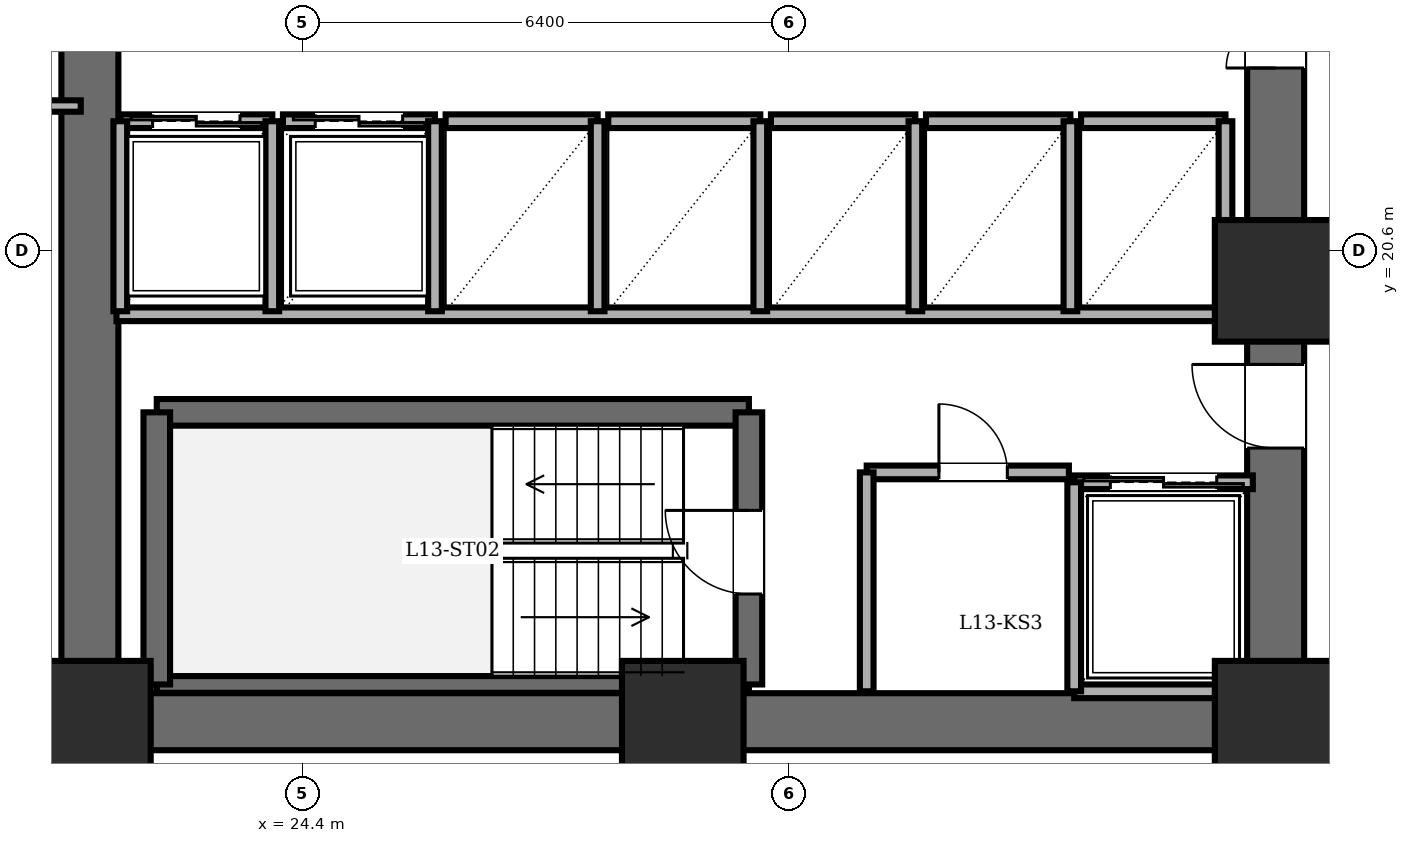
"""IFC4 building model, lengths in metres.
Left out: names, types, materials, properties, quantities, classifications, styles, units other than length and angle.
Written with IfcOpenShell. Run it as: python <this file> out.ifc"""

import sys

from ifc_helpers import new_model, si_unit, direction, frame, frame_2d, origin, origin_2d, place, context, subcontext, project, spatial, rectangle, extrude, element, fill, save


model = new_model("IFC4")
c1 = context("Model", 3, precision=1e-05, world=origin(), true_north=direction((0.0, 1.0)))
c2 = subcontext(c1, "Body", "Model", "MODEL_VIEW")
j1 = project(units=[si_unit("LENGTHUNIT", "METRE"), si_unit("PLANEANGLEUNIT", "RADIAN")], contexts=[c1])
p1 = place(None, origin())
s1 = spatial("IfcSite", under=j1, at=p1, CompositionType="ELEMENT")
p2 = place(p1, origin())
s2 = spatial("IfcBuilding", under=s1, at=p2, CompositionType="ELEMENT")
p3 = place(p2, frame((0.0, 0.0, 50.4)))
s3 = spatial("IfcBuildingStorey", under=s2, at=p3, CompositionType="ELEMENT", Elevation=50.4)
for number, where, z_axis, x_axis in (
    (1, (21.6, 14.4, 0.0), (0.0, 0.0, 1.0), (1.0, 0.0, 0.0)),
    (2, (29.4, 14.4, 0.0), (0.0, 0.0, 1.0), (1.0, 0.0, 0.0)),
    (3, (37.2, 14.4, 0.0), (0.0, 0.0, 1.0), (1.0, 0.0, 0.0)),
    (4, (37.2, 20.2, 0.0), (0.0, 0.0, 1.0), (1.0, 0.0, 0.0)),
):
    element("IfcColumn", number, at=place(p3, frame(where, z_axis=z_axis, x_axis=x_axis)), inside=s3, PredefinedType="COLUMN", context=c2, shape_type="SweptSolid", body=[
        extrude(rectangle(XDim=1.6, YDim=1.6, at=origin_2d()), origin(), (0.0, 0.0, 1.0), 3.6),
    ])
p4 = place(p3, frame((21.6, 14.4, 0.0), z_axis=(0.0, 0.0, 1.0), x_axis=(0.0, 1.0, 0.0)))
e5 = element("IfcWall", 5, at=p4, inside=s3, PredefinedType="SHEAR", context=c2, shape_type="SweptSolid", body=[
    extrude(rectangle(XDim=19.2, YDim=0.75, at=frame_2d((9.6, 0.0))), origin(), (0.0, 0.0, 1.0), 3.4),
])
p5 = place(p3, frame((37.2, 14.4, 0.0), z_axis=(0.0, 0.0, 1.0), x_axis=(-1.0, 0.0, 0.0)))
e6 = element("IfcWall", 6, at=p5, inside=s3, PredefinedType="SHEAR", context=c2, shape_type="SweptSolid", body=[
    extrude(rectangle(XDim=15.6, YDim=0.75, at=frame_2d((7.8, 0.0))), origin(), (0.0, 0.0, 1.0), 3.4),
])
p6 = place(p3, frame((37.2, 14.4, 0.0), z_axis=(0.0, 0.0, 1.0), x_axis=(0.0, 1.0, 0.0)))
e7 = element("IfcWall", 7, at=p6, inside=s3, PredefinedType="SHEAR", context=c2, shape_type="SweptSolid", body=[
    extrude(rectangle(XDim=19.2, YDim=0.75, at=frame_2d((9.6, 0.0))), origin(), (0.0, 0.0, 1.0), 3.4),
])
p7 = place(p6, frame((15.8, 0.0, 0.0)))
e8 = element("IfcOpeningElement", 8, at=p7, cuts=e7, PredefinedType="OPENING", context=c2, shape_type="SweptSolid", body=[
    extrude(rectangle(XDim=1.15, YDim=2.15, at=frame_2d((0.575, 1.075))), frame((0.0, 0.385, 0.0), z_axis=(0.0, -1.0, 0.0), x_axis=(1.0, 0.0, 0.0)), (0.0, 0.0, 1.0), 0.77),
])
p8 = place(p6, frame((3.6, 0.0, 0.0)))
e9 = element("IfcOpeningElement", 9, at=p8, cuts=e7, PredefinedType="OPENING", context=c2, shape_type="SweptSolid", body=[
    extrude(rectangle(XDim=1.1, YDim=2.15, at=frame_2d((0.55, 1.075))), frame((0.0, 0.385, 0.0), z_axis=(0.0, -1.0, 0.0), x_axis=(1.0, 0.0, 0.0)), (0.0, 0.0, 1.0), 0.77),
])
p9 = place(p6, frame((8.6, 0.0, 0.0)))
e10 = element("IfcOpeningElement", 10, at=p9, cuts=e7, PredefinedType="OPENING", context=c2, shape_type="SweptSolid", body=[
    extrude(rectangle(XDim=1.3, YDim=2.2, at=frame_2d((0.65, 1.1))), frame((0.0, 0.385, 0.0), z_axis=(0.0, -1.0, 0.0), x_axis=(1.0, 0.0, 0.0)), (0.0, 0.0, 1.0), 0.77),
])
p10 = place(p3, frame((22.48, 18.47, 0.0), z_axis=(0.0, 0.0, 1.0), x_axis=(1.0, 0.0, 0.0)))
e11 = element("IfcWall", 11, at=p10, inside=s3, PredefinedType="SOLIDWALL", context=c2, shape_type="SweptSolid", body=[
    extrude(rectangle(XDim=7.79, YDim=0.35, at=frame_2d((3.895, 0.0))), origin(), (0.0, 0.0, 1.0), 3.4),
])
p11 = place(p3, frame((22.48, 14.89, 0.0), z_axis=(0.0, 0.0, 1.0), x_axis=(1.0, 0.0, 0.0)))
e12 = element("IfcWall", 12, at=p11, inside=s3, PredefinedType="PARTITIONING", context=c2, shape_type="SweptSolid", body=[
    extrude(rectangle(XDim=7.79, YDim=0.22, at=frame_2d((3.895, 0.0))), origin(), (0.0, 0.0, 1.0), 3.4),
])
p12 = place(p3, frame((22.48, 14.89, 0.0), z_axis=(0.0, 0.0, 1.0), x_axis=(0.0, 1.0, 0.0)))
e13 = element("IfcWall", 13, at=p12, inside=s3, PredefinedType="SOLIDWALL", context=c2, shape_type="SweptSolid", body=[
    extrude(rectangle(XDim=3.58, YDim=0.35, at=frame_2d((1.79, 0.0))), origin(), (0.0, 0.0, 1.0), 3.4),
])
p13 = place(p3, frame((30.27, 14.89, 0.0), z_axis=(0.0, 0.0, 1.0), x_axis=(0.0, 1.0, 0.0)))
e14 = element("IfcWall", 14, at=p13, inside=s3, PredefinedType="SOLIDWALL", context=c2, shape_type="SweptSolid", body=[
    extrude(rectangle(XDim=3.58, YDim=0.35, at=frame_2d((1.79, 0.0))), origin(), (0.0, 0.0, 1.0), 3.4),
])
p14 = place(p13, frame((1.19, 0.0, 0.0)))
e15 = element("IfcOpeningElement", 15, at=p14, cuts=e14, PredefinedType="OPENING", context=c2, shape_type="SweptSolid", body=[
    extrude(rectangle(XDim=1.1, YDim=2.15, at=frame_2d((0.55, 1.075))), frame((0.0, 0.185, 0.0), z_axis=(0.0, -1.0, 0.0), x_axis=(1.0, 0.0, 0.0)), (0.0, 0.0, 1.0), 0.37),
])
p15 = place(p3, frame((21.95, 19.76, 0.0), z_axis=(0.0, 0.0, 1.0), x_axis=(1.0, 0.0, 0.0)))
e16 = element("IfcWall", 16, at=p15, inside=s3, PredefinedType="PARTITIONING", context=c2, shape_type="SweptSolid", body=[
    extrude(rectangle(XDim=14.87, YDim=0.18, at=frame_2d((7.435, 0.0))), origin(), (0.0, 0.0, 1.0), 3.4),
])
p16 = place(p3, frame((31.82, 17.68, 0.0), z_axis=(0.0, 0.0, 1.0), x_axis=(1.0, 0.0, 0.0)))
e17 = element("IfcWall", 17, at=p16, inside=s3, PredefinedType="PARTITIONING", context=c2, shape_type="SweptSolid", body=[
    extrude(rectangle(XDim=2.66, YDim=0.18, at=frame_2d((1.33, 0.0))), origin(), (0.0, 0.0, 1.0), 3.4),
])
p17 = place(p16, frame((0.95, 0.0, 0.0)))
e18 = element("IfcOpeningElement", 18, at=p17, cuts=e17, PredefinedType="OPENING", context=c2, shape_type="SweptSolid", body=[
    extrude(rectangle(XDim=0.9, YDim=2.05, at=frame_2d((0.45, 1.025))), frame((0.0, 0.1, 0.0), z_axis=(0.0, -1.0, 0.0), x_axis=(1.0, 0.0, 0.0)), (0.0, 0.0, 1.0), 0.2),
])
p18 = place(p3, frame((31.82, 14.8, 0.0), z_axis=(0.0, 0.0, 1.0), x_axis=(0.0, 1.0, 0.0)))
e19 = element("IfcWall", 19, at=p18, inside=s3, PredefinedType="PARTITIONING", context=c2, shape_type="SweptSolid", body=[
    extrude(rectangle(XDim=2.88, YDim=0.18, at=frame_2d((1.44, 0.0))), origin(), (0.0, 0.0, 1.0), 3.4),
])
p19 = place(p3, frame((34.55, 17.55, 0.0), z_axis=(0.0, 0.0, 1.0), x_axis=(1.0, 0.0, 0.0)))
e20 = element("IfcWall", 20, at=p19, inside=s3, PredefinedType="PARTITIONING", context=c2, shape_type="SweptSolid", body=[
    extrude(rectangle(XDim=2.35, YDim=0.18, at=frame_2d((1.175, 0.0))), origin(), (0.0, 0.0, 1.0), 3.4),
])
p20 = place(p19, frame((0.475, 0.0, 0.0)))
e21 = element("IfcOpeningElement", 21, at=p20, cuts=e20, PredefinedType="OPENING", context=c2, shape_type="SweptSolid", body=[
    extrude(rectangle(XDim=1.4, YDim=2.3, at=frame_2d((0.7, 1.15))), frame((0.0, 0.1, 0.0), z_axis=(0.0, -1.0, 0.0), x_axis=(1.0, 0.0, 0.0)), (0.0, 0.0, 1.0), 0.2),
])
p21 = place(p3, frame((36.9, 14.8, 0.0), z_axis=(0.0, 0.0, 1.0), x_axis=(-1.0, 0.0, 0.0)))
e22 = element("IfcWall", 22, at=p21, inside=s3, PredefinedType="PARTITIONING", context=c2, shape_type="SweptSolid", body=[
    extrude(rectangle(XDim=2.35, YDim=0.18, at=frame_2d((1.175, 0.0))), origin(), (0.0, 0.0, 1.0), 3.4),
])
p22 = place(p3, frame((34.55, 17.55, 0.0), z_axis=(0.0, 0.0, 1.0), x_axis=(0.0, -1.0, 0.0)))
e23 = element("IfcWall", 23, at=p22, inside=s3, PredefinedType="PARTITIONING", context=c2, shape_type="SweptSolid", body=[
    extrude(rectangle(XDim=2.75, YDim=0.18, at=frame_2d((1.375, 0.0))), origin(), (0.0, 0.0, 1.0), 3.4),
])
p23 = place(p3, frame((22.0, 22.3, 0.0), z_axis=(0.0, 0.0, 1.0), x_axis=(1.0, 0.0, 0.0)))
e24 = element("IfcWall", 24, at=p23, inside=s3, PredefinedType="PARTITIONING", context=c2, shape_type="SweptSolid", body=[
    extrude(rectangle(XDim=2.0, YDim=0.18, at=frame_2d((1.0, 0.0))), origin(), (0.0, 0.0, 1.0), 3.4),
])
p24 = place(p23, frame((0.425, 0.0, 0.0)))
e25 = element("IfcOpeningElement", 25, at=p24, cuts=e24, PredefinedType="OPENING", context=c2, shape_type="SweptSolid", body=[
    extrude(rectangle(XDim=1.15, YDim=2.2, at=frame_2d((0.575, 1.1))), frame((0.0, 0.1, 0.0), z_axis=(0.0, -1.0, 0.0), x_axis=(1.0, 0.0, 0.0)), (0.0, 0.0, 1.0), 0.2),
])
for number, where, z_axis, x_axis in (
    (26, (24.0, 19.8, 0.0), (0.0, 0.0, 1.0), (0.0, 1.0, 0.0)),
    (27, (22.0, 22.3, 0.0), (0.0, 0.0, 1.0), (0.0, -1.0, 0.0)),
):
    element("IfcWall", number, at=place(p3, frame(where, z_axis=z_axis, x_axis=x_axis)), inside=s3, PredefinedType="PARTITIONING", context=c2, shape_type="SweptSolid", body=[
        extrude(rectangle(XDim=2.5, YDim=0.18, at=frame_2d((1.25, 0.0))), origin(), (0.0, 0.0, 1.0), 3.4),
    ])
p25 = place(p3, frame((24.14, 22.3, 0.0), z_axis=(0.0, 0.0, 1.0), x_axis=(1.0, 0.0, 0.0)))
e28 = element("IfcWall", 28, at=p25, inside=s3, PredefinedType="PARTITIONING", context=c2, shape_type="SweptSolid", body=[
    extrude(rectangle(XDim=2.0, YDim=0.18, at=frame_2d((1.0, 0.0))), origin(), (0.0, 0.0, 1.0), 3.4),
])
p26 = place(p25, frame((0.425, 0.0, 0.0)))
e29 = element("IfcOpeningElement", 29, at=p26, cuts=e28, PredefinedType="OPENING", context=c2, shape_type="SweptSolid", body=[
    extrude(rectangle(XDim=1.15, YDim=2.2, at=frame_2d((0.575, 1.1))), frame((0.0, 0.1, 0.0), z_axis=(0.0, -1.0, 0.0), x_axis=(1.0, 0.0, 0.0)), (0.0, 0.0, 1.0), 0.2),
])
p27 = place(p3, frame((26.14, 19.8, 0.0), z_axis=(0.0, 0.0, 1.0), x_axis=(0.0, 1.0, 0.0)))
e30 = element("IfcWall", 30, at=p27, inside=s3, PredefinedType="PARTITIONING", context=c2, shape_type="SweptSolid", body=[
    extrude(rectangle(XDim=2.5, YDim=0.18, at=frame_2d((1.25, 0.0))), origin(), (0.0, 0.0, 1.0), 3.4),
])
p28 = place(p3, frame((26.28, 22.3, 0.0), z_axis=(0.0, 0.0, 1.0), x_axis=(1.0, 0.0, 0.0)))
e31 = element("IfcWall", 31, at=p28, inside=s3, PredefinedType="PARTITIONING", context=c2, shape_type="SweptSolid", body=[
    extrude(rectangle(XDim=2.0, YDim=0.18, at=frame_2d((1.0, 0.0))), origin(), (0.0, 0.0, 1.0), 3.4),
])
p29 = place(p3, frame((28.28, 19.8, 0.0), z_axis=(0.0, 0.0, 1.0), x_axis=(0.0, 1.0, 0.0)))
e32 = element("IfcWall", 32, at=p29, inside=s3, PredefinedType="PARTITIONING", context=c2, shape_type="SweptSolid", body=[
    extrude(rectangle(XDim=2.5, YDim=0.18, at=frame_2d((1.25, 0.0))), origin(), (0.0, 0.0, 1.0), 3.4),
])
p30 = place(p3, frame((28.42, 22.3, 0.0), z_axis=(0.0, 0.0, 1.0), x_axis=(1.0, 0.0, 0.0)))
e33 = element("IfcWall", 33, at=p30, inside=s3, PredefinedType="PARTITIONING", context=c2, shape_type="SweptSolid", body=[
    extrude(rectangle(XDim=2.0, YDim=0.18, at=frame_2d((1.0, 0.0))), origin(), (0.0, 0.0, 1.0), 3.4),
])
p31 = place(p3, frame((30.42, 19.8, 0.0), z_axis=(0.0, 0.0, 1.0), x_axis=(0.0, 1.0, 0.0)))
e34 = element("IfcWall", 34, at=p31, inside=s3, PredefinedType="PARTITIONING", context=c2, shape_type="SweptSolid", body=[
    extrude(rectangle(XDim=2.5, YDim=0.18, at=frame_2d((1.25, 0.0))), origin(), (0.0, 0.0, 1.0), 3.4),
])
p32 = place(p3, frame((30.56, 22.3, 0.0), z_axis=(0.0, 0.0, 1.0), x_axis=(1.0, 0.0, 0.0)))
e35 = element("IfcWall", 35, at=p32, inside=s3, PredefinedType="PARTITIONING", context=c2, shape_type="SweptSolid", body=[
    extrude(rectangle(XDim=1.9, YDim=0.18, at=frame_2d((0.95, 0.0))), origin(), (0.0, 0.0, 1.0), 3.4),
])
p33 = place(p3, frame((32.46, 19.8, 0.0), z_axis=(0.0, 0.0, 1.0), x_axis=(0.0, 1.0, 0.0)))
e36 = element("IfcWall", 36, at=p33, inside=s3, PredefinedType="PARTITIONING", context=c2, shape_type="SweptSolid", body=[
    extrude(rectangle(XDim=2.5, YDim=0.18, at=frame_2d((1.25, 0.0))), origin(), (0.0, 0.0, 1.0), 3.4),
])
p34 = place(p3, frame((32.6, 22.3, 0.0), z_axis=(0.0, 0.0, 1.0), x_axis=(1.0, 0.0, 0.0)))
e37 = element("IfcWall", 37, at=p34, inside=s3, PredefinedType="PARTITIONING", context=c2, shape_type="SweptSolid", body=[
    extrude(rectangle(XDim=1.9, YDim=0.18, at=frame_2d((0.95, 0.0))), origin(), (0.0, 0.0, 1.0), 3.4),
])
p35 = place(p3, frame((34.5, 19.8, 0.0), z_axis=(0.0, 0.0, 1.0), x_axis=(0.0, 1.0, 0.0)))
e38 = element("IfcWall", 38, at=p35, inside=s3, PredefinedType="PARTITIONING", context=c2, shape_type="SweptSolid", body=[
    extrude(rectangle(XDim=2.5, YDim=0.18, at=frame_2d((1.25, 0.0))), origin(), (0.0, 0.0, 1.0), 3.4),
])
p36 = place(p3, frame((34.64, 22.3, 0.0), z_axis=(0.0, 0.0, 1.0), x_axis=(1.0, 0.0, 0.0)))
e39 = element("IfcWall", 39, at=p36, inside=s3, PredefinedType="PARTITIONING", context=c2, shape_type="SweptSolid", body=[
    extrude(rectangle(XDim=1.9, YDim=0.18, at=frame_2d((0.95, 0.0))), origin(), (0.0, 0.0, 1.0), 3.4),
])
p37 = place(p3, frame((36.54, 19.8, 0.0), z_axis=(0.0, 0.0, 1.0), x_axis=(0.0, 1.0, 0.0)))
e40 = element("IfcWall", 40, at=p37, inside=s3, PredefinedType="PARTITIONING", context=c2, shape_type="SweptSolid", body=[
    extrude(rectangle(XDim=2.5, YDim=0.18, at=frame_2d((1.25, 0.0))), origin(), (0.0, 0.0, 1.0), 3.4),
])
p38 = place(p3, frame((3.4, 14.18, 0.0), z_axis=(0.0, 0.0, 1.0), x_axis=(1.0, 0.0, 0.0)))
e41 = element("IfcWall", 41, at=p38, inside=s3, PredefinedType="PARTITIONING", context=c2, shape_type="SweptSolid", body=[
    extrude(rectangle(XDim=18.08, YDim=0.15, at=frame_2d((9.04, 0.0))), origin(), (0.0, 0.0, 1.0), 3.4),
])
p39 = place(p38, frame((9.58, 0.0, 0.0)))
e42 = element("IfcOpeningElement", 42, at=p39, cuts=e41, PredefinedType="OPENING", context=c2, shape_type="SweptSolid", body=[
    extrude(rectangle(XDim=1.0, YDim=2.15, at=frame_2d((0.5, 1.075))), frame((0.0, 0.085, 0.0), z_axis=(0.0, -1.0, 0.0), x_axis=(1.0, 0.0, 0.0)), (0.0, 0.0, 1.0), 0.17),
])
p40 = place(p3, frame((3.4, 22.5, 0.0), z_axis=(0.0, 0.0, 1.0), x_axis=(1.0, 0.0, 0.0)))
e43 = element("IfcWall", 43, at=p40, inside=s3, PredefinedType="PARTITIONING", context=c2, shape_type="SweptSolid", body=[
    extrude(rectangle(XDim=18.08, YDim=0.15, at=frame_2d((9.04, 0.0))), origin(), (0.0, 0.0, 1.0), 3.4),
])
p41 = place(p14, origin())
e44 = element("IfcDoor", 44, at=p41, inside=s3, OperationType="SINGLE_SWING_RIGHT", PredefinedType="DOOR", context=c2, shape_type="SweptSolid", body=[
    extrude(rectangle(XDim=1.1, YDim=2.15, at=frame_2d((0.55, 1.075))), frame((0.0, 0.025, 0.0), z_axis=(0.0, -1.0, 0.0), x_axis=(1.0, 0.0, 0.0)), (0.0, 0.0, 1.0), 0.05),
])
fill(e15, e44)
p42 = place(p8, origin())
e45 = element("IfcDoor", 45, at=p42, inside=s3, OperationType="SINGLE_SWING_RIGHT", PredefinedType="DOOR", context=c2, shape_type="SweptSolid", body=[
    extrude(rectangle(XDim=1.1, YDim=2.15, at=frame_2d((0.55, 1.075))), frame((0.0, 0.025, 0.0), z_axis=(0.0, -1.0, 0.0), x_axis=(1.0, 0.0, 0.0)), (0.0, 0.0, 1.0), 0.05),
])
fill(e9, e45)
p43 = place(p17, origin())
e46 = element("IfcDoor", 46, at=p43, inside=s3, OperationType="SINGLE_SWING_LEFT", PredefinedType="DOOR", context=c2, shape_type="SweptSolid", body=[
    extrude(rectangle(XDim=0.9, YDim=2.05, at=frame_2d((0.45, 1.025))), frame((0.0, 0.025, 0.0), z_axis=(0.0, -1.0, 0.0), x_axis=(1.0, 0.0, 0.0)), (0.0, 0.0, 1.0), 0.05),
])
fill(e18, e46)
p44 = place(p20, origin())
e47 = element("IfcDoor", 47, at=p44, inside=s3, OperationType="DOUBLE_DOOR_SLIDING", PredefinedType="DOOR", context=c2, shape_type="SweptSolid", body=[
    extrude(rectangle(XDim=1.4, YDim=2.3, at=frame_2d((0.7, 1.15))), frame((0.0, 0.025, 0.0), z_axis=(0.0, -1.0, 0.0), x_axis=(1.0, 0.0, 0.0)), (0.0, 0.0, 1.0), 0.05),
])
fill(e21, e47)
p45 = place(p24, origin())
e48 = element("IfcDoor", 48, at=p45, inside=s3, OperationType="DOUBLE_DOOR_SLIDING", PredefinedType="DOOR", context=c2, shape_type="SweptSolid", body=[
    extrude(rectangle(XDim=1.15, YDim=2.2, at=frame_2d((0.575, 1.1))), frame((0.0, 0.025, 0.0), z_axis=(0.0, -1.0, 0.0), x_axis=(1.0, 0.0, 0.0)), (0.0, 0.0, 1.0), 0.05),
])
fill(e25, e48)
p46 = place(p26, origin())
e49 = element("IfcDoor", 49, at=p46, inside=s3, OperationType="DOUBLE_DOOR_SLIDING", PredefinedType="DOOR", context=c2, shape_type="SweptSolid", body=[
    extrude(rectangle(XDim=1.15, YDim=2.2, at=frame_2d((0.575, 1.1))), frame((0.0, 0.025, 0.0), z_axis=(0.0, -1.0, 0.0), x_axis=(1.0, 0.0, 0.0)), (0.0, 0.0, 1.0), 0.05),
])
fill(e29, e49)
p47 = place(p9, origin())
e50 = element("IfcDoor", 50, at=p47, inside=s3, OperationType="DOUBLE_DOOR_SINGLE_SWING", PredefinedType="DOOR", context=c2, shape_type="SweptSolid", body=[
    extrude(rectangle(XDim=1.3, YDim=2.2, at=frame_2d((0.65, 1.1))), frame((0.0, 0.025, 0.0), z_axis=(0.0, -1.0, 0.0), x_axis=(1.0, 0.0, 0.0)), (0.0, 0.0, 1.0), 0.05),
])
fill(e10, e50)
save(model, sys.argv[1])
